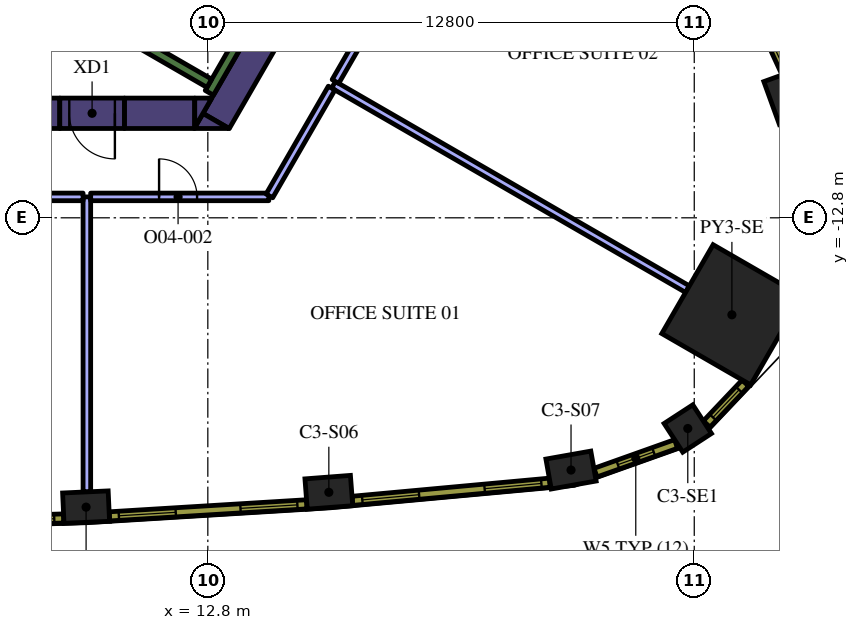
"""IFC4 building model, lengths in metres.
Left out: names, types, materials, properties, quantities, classifications, styles, units other than length and angle.
Written with IfcOpenShell. Run it as: python <this file> out.ifc"""

import sys

from ifc_helpers import new_model, si_unit, direction, frame, frame_2d, origin, origin_2d, place, context, subcontext, project, spatial, polyline, rectangle, outline, extrude, element, fill, save


model = new_model("IFC4")
c1 = context("Model", 3, precision=1e-05, world=origin(), true_north=direction((0.0, 1.0)))
c2 = subcontext(c1, "Body", "Model", "MODEL_VIEW")
j1 = project(units=[si_unit("LENGTHUNIT", "METRE"), si_unit("PLANEANGLEUNIT", "RADIAN")], contexts=[c1])
p1 = place(None, origin())
s1 = spatial("IfcSite", under=j1, at=p1, CompositionType="ELEMENT")
p2 = place(p1, origin())
s2 = spatial("IfcBuilding", under=s1, at=p2, CompositionType="ELEMENT")
p3 = place(p2, frame((0.0, 0.0, 183.6)))
s3 = spatial("IfcBuildingStorey", under=s2, at=p3, CompositionType="ELEMENT", Elevation=183.6)
p4 = place(p3, frame((26.591, -15.352, 0.0), z_axis=(0.0, 0.0, 1.0), x_axis=(0.866025403784, -0.5, 0.0)))
e1 = element("IfcColumn", 1, at=p4, inside=s3, PredefinedType="COLUMN", context=c2, shape_type="SweptSolid", body=[
    extrude(rectangle(XDim=2.7, YDim=2.7, at=origin_2d()), origin(), (0.0, 0.0, 1.0), 4.2),
])
for number, where, z_axis, x_axis in (
    (2, (9.597, -20.413, 0.0), (0.0, 0.0, 1.0), (0.999, 0.046, 0.0)),
    (3, (15.985, -20.022, 0.0), (0.0, 0.0, 1.0), (0.997, 0.076, 0.0)),
    (4, (22.357, -19.437, 0.0), (0.0, 0.0, 1.0), (0.985, 0.175, 0.0)),
):
    element("IfcColumn", number, at=place(p3, frame(where, z_axis=z_axis, x_axis=x_axis)), inside=s3, PredefinedType="COLUMN", context=c2, shape_type="SweptSolid", body=[
        extrude(rectangle(XDim=1.2, YDim=0.8, at=origin_2d()), origin(), (0.0, 0.0, 1.0), 4.2),
    ])
p5 = place(p3, frame((25.43, -18.344, 0.0), z_axis=(0.0, 0.0, 1.0), x_axis=(0.838094050847, 0.545525766518, 0.0)))
e5 = element("IfcColumn", 5, at=p5, inside=s3, PredefinedType="COLUMN", context=c2, shape_type="SweptSolid", body=[
    extrude(rectangle(XDim=0.9, YDim=0.9, at=origin_2d()), origin(), (0.0, 0.0, 1.0), 4.2),
])
p6 = place(p3, frame((28.012, -9.644, 0.0), z_axis=(0.0, 0.0, 1.0), x_axis=(-0.340743851601, 0.940156171918, 0.0)))
e6 = element("IfcColumn", 6, at=p6, inside=s3, PredefinedType="COLUMN", context=c2, shape_type="SweptSolid", body=[
    extrude(rectangle(XDim=1.2, YDim=0.8, at=origin_2d()), origin(), (0.0, 0.0, 1.0), 4.2),
])
p7 = place(p3, frame((13.018, -10.252, 0.0), z_axis=(0.0, 0.0, 1.0), x_axis=(0.499984020225, 0.866034629516, 0.0)))
e7 = element("IfcWall", 7, at=p7, inside=s3, PredefinedType="SOLIDWALL", context=c2, shape_type="SweptSolid", body=[
    extrude(rectangle(XDim=3.824, YDim=0.8, at=frame_2d((1.912, 0.0))), origin(), (0.0, 0.0, 1.0), 4.2),
])
p8 = place(p3, origin())
e8 = element("IfcWall", 8, at=p8, inside=s3, PredefinedType="SOLIDWALL", context=c2, shape_type="SweptSolid", body=[
    extrude(outline(polyline([(12.671, -10.053), (13.358, -10.45), (12.442, -10.45), (12.671, -10.053)])), origin(), (0.0, 0.0, 1.0), 4.2),
])
p9 = place(p3, frame((10.604, -10.05, 0.0), z_axis=(0.0, 0.0, 1.0), x_axis=(1.0, 0.0, 0.0)))
e9 = element("IfcWall", 9, at=p9, inside=s3, PredefinedType="SOLIDWALL", context=c2, shape_type="SweptSolid", body=[
    extrude(rectangle(XDim=1.849, YDim=0.8, at=frame_2d((0.925, 0.0))), origin(), (0.0, 0.0, 1.0), 4.2),
])
e10 = element("IfcWall", 10, at=p8, inside=s3, PredefinedType="SOLIDWALL", context=c2, shape_type="SweptSolid", body=[
    extrude(outline(polyline([(12.904, -9.65), (12.456, -10.426), (12.456, -9.65), (12.904, -9.65)])), origin(), (0.0, 0.0, 1.0), 4.2),
])
p10 = place(p3, frame((-13.378, -10.05, 0.0), z_axis=(0.0, 0.0, 1.0), x_axis=(1.0, 0.0, 0.0)))
e11 = element("IfcWall", 11, at=p10, inside=s3, PredefinedType="SOLIDWALL", context=c2, shape_type="SweptSolid", body=[
    extrude(rectangle(XDim=22.282, YDim=0.8, at=frame_2d((11.141, 0.0))), origin(), (0.0, 0.0, 1.0), 4.2),
])
p11 = place(p3, frame((12.84, -9.511, 0.0), z_axis=(0.0, 0.0, 1.0), x_axis=(0.499997733992, 0.866026712061, 0.0)))
e12 = element("IfcWall", 12, at=p11, inside=s3, PredefinedType="SOLIDWALL", context=c2, shape_type="SweptSolid", body=[
    extrude(rectangle(XDim=3.634, YDim=0.25, at=frame_2d((1.817, 0.0))), origin(), (0.0, 0.0, 1.0), 4.2),
])
p12 = place(p3, frame((12.84, -9.261, 0.0), z_axis=(0.0, 0.0, 1.0), x_axis=(-0.866013990052, 0.500019768644, 0.0)))
e13 = element("IfcWall", 13, at=p12, inside=s3, PredefinedType="SOLIDWALL", context=c2, shape_type="SweptSolid", body=[
    extrude(rectangle(XDim=6.8, YDim=0.25, at=frame_2d((3.4, 0.0))), origin(), (0.0, 0.0, 1.0), 4.2),
])
p13 = place(p3, frame((10.604, -10.05, 0.0), z_axis=(0.0, 0.0, 1.0), x_axis=(-1.0, 0.0, 0.0)))
e14 = element("IfcWall", 14, at=p13, inside=s3, PredefinedType="SOLIDWALL", context=c2, shape_type="SweptSolid", body=[
    extrude(rectangle(XDim=1.7, YDim=0.8, at=frame_2d((0.85, 0.0))), origin(), (0.0, 0.0, 1.0), 4.2),
])
p14 = place(p13, frame((0.25, 0.0, 0.0)))
e15 = element("IfcOpeningElement", 15, at=p14, cuts=e14, PredefinedType="OPENING", context=c2, shape_type="SweptSolid", body=[
    extrude(rectangle(XDim=1.2, YDim=2.1, at=frame_2d((0.6, 1.05))), frame((0.0, 0.41, 0.0), z_axis=(0.0, -1.0, 0.0), x_axis=(1.0, 0.0, 0.0)), (0.0, 0.0, 1.0), 0.82),
])
p15 = place(p3, frame((9.617, -12.25, 0.0), z_axis=(0.0, 0.0, 1.0), x_axis=(0.0, -1.0, 0.0)))
e16 = element("IfcWall", 16, at=p15, inside=s3, PredefinedType="PARTITIONING", context=c2, shape_type="SweptSolid", body=[
    extrude(rectangle(XDim=7.761, YDim=0.2, at=frame_2d((3.881, 0.0))), origin(), (0.0, 0.0, 1.0), 3.15),
])
p16 = place(p3, frame((3.53, -12.25, 0.0), z_axis=(0.0, 0.0, 1.0), x_axis=(1.0, 0.0, 0.0)))
e17 = element("IfcWall", 17, at=p16, inside=s3, PredefinedType="PARTITIONING", context=c2, shape_type="SweptSolid", body=[
    extrude(rectangle(XDim=5.987, YDim=0.2, at=frame_2d((2.994, 0.0))), origin(), (0.0, 0.0, 1.0), 3.15),
])
p17 = place(p3, frame((16.108, -9.3, 0.0), z_axis=(0.0, 0.0, 1.0), x_axis=(0.866027180319, -0.499996922939, 0.0)))
e18 = element("IfcWall", 18, at=p17, inside=s3, PredefinedType="PARTITIONING", context=c2, shape_type="SweptSolid", body=[
    extrude(rectangle(XDim=10.754, YDim=0.2, at=frame_2d((5.377, 0.0))), origin(), (0.0, 0.0, 1.0), 3.15),
])
p18 = place(p3, frame((9.717, -12.25, 0.0), z_axis=(0.0, 0.0, 1.0), x_axis=(1.0, 0.0, 0.0)))
e19 = element("IfcWall", 19, at=p18, inside=s3, PredefinedType="PARTITIONING", context=c2, shape_type="SweptSolid", body=[
    extrude(rectangle(XDim=4.688, YDim=0.2, at=frame_2d((2.344, 0.0))), origin(), (0.0, 0.0, 1.0), 3.15),
])
p19 = place(p18, frame((1.8, 0.0, 0.0)))
e20 = element("IfcOpeningElement", 20, at=p19, cuts=e19, PredefinedType="OPENING", context=c2, shape_type="SweptSolid", body=[
    extrude(rectangle(XDim=1.0, YDim=2.1, at=frame_2d((0.5, 1.05))), frame((0.0, 0.11, 0.0), z_axis=(0.0, -1.0, 0.0), x_axis=(1.0, 0.0, 0.0)), (0.0, 0.0, 1.0), 0.22),
])
p20 = place(p3, frame((14.42, -12.224, 0.0), z_axis=(0.0, 0.0, 1.0), x_axis=(0.500001965626, 0.866024268927, 0.0)))
e21 = element("IfcWall", 21, at=p20, inside=s3, PredefinedType="PARTITIONING", context=c2, shape_type="SweptSolid", body=[
    extrude(rectangle(XDim=3.276, YDim=0.2, at=frame_2d((1.638, 0.0))), origin(), (0.0, 0.0, 1.0), 3.15),
])
p21 = place(p3, frame((16.158, -9.213, 0.0), z_axis=(0.0, 0.0, 1.0), x_axis=(0.499990919662, 0.866030646256, 0.0)))
e22 = element("IfcWall", 22, at=p21, inside=s3, PredefinedType="PARTITIONING", context=c2, shape_type="SweptSolid", body=[
    extrude(rectangle(XDim=3.306, YDim=0.2, at=frame_2d((1.653, 0.0))), origin(), (0.0, 0.0, 1.0), 3.15),
])
p22 = place(p3, frame((3.806, -20.87, 0.0), z_axis=(0.0, 0.0, 1.0), x_axis=(0.999533441983, 0.030543384845, 0.0)))
e23 = element("IfcWall", 23, at=p22, inside=s3, PredefinedType="SOLIDWALL", context=c2, shape_type="SweptSolid", body=[
    extrude(rectangle(XDim=5.204, YDim=0.24, at=frame_2d((2.602, 0.0))), origin(), (0.0, 0.0, 1.0), 3.95),
])
p23 = place(p22, frame((0.248, 0.0, 0.9)))
e24 = element("IfcOpeningElement", 24, at=p23, cuts=e23, PredefinedType="OPENING", context=c2, shape_type="SweptSolid", body=[
    extrude(rectangle(XDim=1.5, YDim=2.55, at=frame_2d((0.75, 1.275))), frame((0.0, 0.13, 0.0), z_axis=(0.0, -1.0, 0.0), x_axis=(1.0, 0.0, 0.0)), (0.0, 0.0, 1.0), 0.26),
])
p24 = place(p22, frame((3.455, 0.0, 0.9)))
e25 = element("IfcOpeningElement", 25, at=p24, cuts=e23, PredefinedType="OPENING", context=c2, shape_type="SweptSolid", body=[
    extrude(rectangle(XDim=1.5, YDim=2.55, at=frame_2d((0.75, 1.275))), frame((0.0, 0.13, 0.0), z_axis=(0.0, -1.0, 0.0), x_axis=(1.0, 0.0, 0.0)), (0.0, 0.0, 1.0), 0.26),
])
p25 = place(p3, frame((10.211, -20.656, 0.0), z_axis=(0.0, 0.0, 1.0), x_axis=(0.998135294646, 0.061040425794, 0.0)))
e26 = element("IfcWall", 26, at=p25, inside=s3, PredefinedType="SOLIDWALL", context=c2, shape_type="SweptSolid", body=[
    extrude(rectangle(XDim=5.204, YDim=0.24, at=frame_2d((2.602, 0.0))), origin(), (0.0, 0.0, 1.0), 3.95),
])
p26 = place(p25, frame((0.248, 0.0, 0.9)))
e27 = element("IfcOpeningElement", 27, at=p26, cuts=e26, PredefinedType="OPENING", context=c2, shape_type="SweptSolid", body=[
    extrude(rectangle(XDim=1.5, YDim=2.55, at=frame_2d((0.75, 1.275))), frame((0.0, 0.13, 0.0), z_axis=(0.0, -1.0, 0.0), x_axis=(1.0, 0.0, 0.0)), (0.0, 0.0, 1.0), 0.26),
])
p27 = place(p25, frame((3.455, 0.0, 0.9)))
e28 = element("IfcOpeningElement", 28, at=p27, cuts=e26, PredefinedType="OPENING", context=c2, shape_type="SweptSolid", body=[
    extrude(rectangle(XDim=1.5, YDim=2.55, at=frame_2d((0.75, 1.275))), frame((0.0, 0.13, 0.0), z_axis=(0.0, -1.0, 0.0), x_axis=(1.0, 0.0, 0.0)), (0.0, 0.0, 1.0), 0.26),
])
p28 = place(p3, frame((16.606, -20.247, 0.0), z_axis=(0.0, 0.0, 1.0), x_axis=(0.995808712151, 0.091460422067, 0.0)))
e29 = element("IfcWall", 29, at=p28, inside=s3, PredefinedType="SOLIDWALL", context=c2, shape_type="SweptSolid", body=[
    extrude(rectangle(XDim=5.213, YDim=0.24, at=frame_2d((2.606, 0.0))), origin(), (0.0, 0.0, 1.0), 3.95),
])
p29 = place(p28, frame((0.261, 0.0, 0.9)))
e30 = element("IfcOpeningElement", 30, at=p29, cuts=e29, PredefinedType="OPENING", context=c2, shape_type="SweptSolid", body=[
    extrude(rectangle(XDim=1.5, YDim=2.55, at=frame_2d((0.75, 1.275))), frame((0.0, 0.13, 0.0), z_axis=(0.0, -1.0, 0.0), x_axis=(1.0, 0.0, 0.0)), (0.0, 0.0, 1.0), 0.26),
])
p30 = place(p28, frame((3.492, 0.0, 0.9)))
e31 = element("IfcOpeningElement", 31, at=p30, cuts=e29, PredefinedType="OPENING", context=c2, shape_type="SweptSolid", body=[
    extrude(rectangle(XDim=1.5, YDim=2.55, at=frame_2d((0.75, 1.275))), frame((0.0, 0.13, 0.0), z_axis=(0.0, -1.0, 0.0), x_axis=(1.0, 0.0, 0.0)), (0.0, 0.0, 1.0), 0.26),
])
p31 = place(p3, frame((23.001, -19.505, 0.0), z_axis=(0.0, 0.0, 1.0), x_axis=(0.942099727267, 0.335332825539, 0.0)))
e32 = element("IfcWall", 32, at=p31, inside=s3, PredefinedType="SOLIDWALL", context=c2, shape_type="SweptSolid", body=[
    extrude(rectangle(XDim=2.25, YDim=0.24, at=frame_2d((1.125, 0.0))), origin(), (0.0, 0.0, 1.0), 3.95),
])
p32 = place(p31, frame((0.625, 0.0, 0.9)))
e33 = element("IfcOpeningElement", 33, at=p32, cuts=e32, PredefinedType="OPENING", context=c2, shape_type="SweptSolid", body=[
    extrude(rectangle(XDim=1.0, YDim=2.55, at=frame_2d((0.5, 1.275))), frame((0.0, 0.13, 0.0), z_axis=(0.0, -1.0, 0.0), x_axis=(1.0, 0.0, 0.0)), (0.0, 0.0, 1.0), 0.26),
])
p33 = place(p3, frame((25.927, -18.226, 0.0), z_axis=(0.0, 0.0, 1.0), x_axis=(0.687986858937, 0.725723144133, 0.0)))
e34 = element("IfcWall", 34, at=p33, inside=s3, PredefinedType="SOLIDWALL", context=c2, shape_type="SweptSolid", body=[
    extrude(rectangle(XDim=1.481, YDim=0.24, at=frame_2d((0.741, 0.0))), origin(), (0.0, 0.0, 1.0), 3.95),
])
p34 = place(p33, frame((0.241, 0.0, 0.9)))
e35 = element("IfcOpeningElement", 35, at=p34, cuts=e34, PredefinedType="OPENING", context=c2, shape_type="SweptSolid", body=[
    extrude(rectangle(XDim=1.0, YDim=2.55, at=frame_2d((0.5, 1.275))), frame((0.0, 0.13, 0.0), z_axis=(0.0, -1.0, 0.0), x_axis=(1.0, 0.0, 0.0)), (0.0, 0.0, 1.0), 0.26),
])
p35 = place(p3, frame((28.02, -8.992, 0.0), z_axis=(0.0, 0.0, 1.0), x_axis=(-0.418722559465, 0.908114209885, 0.0)))
e36 = element("IfcWall", 36, at=p35, inside=s3, PredefinedType="SOLIDWALL", context=c2, shape_type="SweptSolid", body=[
    extrude(rectangle(XDim=5.213, YDim=0.24, at=frame_2d((2.606, 0.0))), origin(), (0.0, 0.0, 1.0), 3.95),
])
p36 = place(p35, frame((0.221, 0.0, 0.9)))
e37 = element("IfcOpeningElement", 37, at=p36, cuts=e36, PredefinedType="OPENING", context=c2, shape_type="SweptSolid", body=[
    extrude(rectangle(XDim=1.5, YDim=2.55, at=frame_2d((0.75, 1.275))), frame((0.0, 0.13, 0.0), z_axis=(0.0, -1.0, 0.0), x_axis=(1.0, 0.0, 0.0)), (0.0, 0.0, 1.0), 0.26),
])
p37 = place(p35, frame((3.452, 0.0, 0.9)))
e38 = element("IfcOpeningElement", 38, at=p37, cuts=e36, PredefinedType="OPENING", context=c2, shape_type="SweptSolid", body=[
    extrude(rectangle(XDim=1.5, YDim=2.55, at=frame_2d((0.75, 1.275))), frame((0.0, 0.13, 0.0), z_axis=(0.0, -1.0, 0.0), x_axis=(1.0, 0.0, 0.0)), (0.0, 0.0, 1.0), 0.26),
])
p38 = place(p14, origin())
e39 = element("IfcDoor", 39, at=p38, inside=s3, OperationType="SINGLE_SWING_LEFT", PredefinedType="DOOR", context=c2, shape_type="SweptSolid", body=[
    extrude(rectangle(XDim=1.2, YDim=2.1, at=frame_2d((0.6, 1.05))), frame((0.0, 0.025, 0.0), z_axis=(0.0, -1.0, 0.0), x_axis=(1.0, 0.0, 0.0)), (0.0, 0.0, 1.0), 0.05),
])
fill(e15, e39)
p39 = place(p19, origin())
e40 = element("IfcDoor", 40, at=p39, inside=s3, OperationType="SINGLE_SWING_LEFT", PredefinedType="DOOR", context=c2, shape_type="SweptSolid", body=[
    extrude(rectangle(XDim=1.0, YDim=2.1, at=frame_2d((0.5, 1.05))), frame((0.0, 0.025, 0.0), z_axis=(0.0, -1.0, 0.0), x_axis=(1.0, 0.0, 0.0)), (0.0, 0.0, 1.0), 0.05),
])
fill(e20, e40)
p40 = place(p24, origin())
e41 = element("IfcWindow", 41, at=p40, inside=s3, PartitioningType="SINGLE_PANEL", PredefinedType="WINDOW", context=c2, shape_type="SweptSolid", body=[
    extrude(rectangle(XDim=1.5, YDim=2.55, at=frame_2d((0.75, 1.275))), frame((0.0, 0.04, 0.0), z_axis=(0.0, -1.0, 0.0), x_axis=(1.0, 0.0, 0.0)), (0.0, 0.0, 1.0), 0.06),
])
fill(e25, e41)
p41 = place(p26, origin())
e42 = element("IfcWindow", 42, at=p41, inside=s3, PartitioningType="SINGLE_PANEL", PredefinedType="WINDOW", context=c2, shape_type="SweptSolid", body=[
    extrude(rectangle(XDim=1.5, YDim=2.55, at=frame_2d((0.75, 1.275))), frame((0.0, 0.04, 0.0), z_axis=(0.0, -1.0, 0.0), x_axis=(1.0, 0.0, 0.0)), (0.0, 0.0, 1.0), 0.06),
])
fill(e27, e42)
p42 = place(p27, origin())
e43 = element("IfcWindow", 43, at=p42, inside=s3, PartitioningType="SINGLE_PANEL", PredefinedType="WINDOW", context=c2, shape_type="SweptSolid", body=[
    extrude(rectangle(XDim=1.5, YDim=2.55, at=frame_2d((0.75, 1.275))), frame((0.0, 0.04, 0.0), z_axis=(0.0, -1.0, 0.0), x_axis=(1.0, 0.0, 0.0)), (0.0, 0.0, 1.0), 0.06),
])
fill(e28, e43)
p43 = place(p29, origin())
e44 = element("IfcWindow", 44, at=p43, inside=s3, PartitioningType="SINGLE_PANEL", PredefinedType="WINDOW", context=c2, shape_type="SweptSolid", body=[
    extrude(rectangle(XDim=1.5, YDim=2.55, at=frame_2d((0.75, 1.275))), frame((0.0, 0.04, 0.0), z_axis=(0.0, -1.0, 0.0), x_axis=(1.0, 0.0, 0.0)), (0.0, 0.0, 1.0), 0.06),
])
fill(e30, e44)
p44 = place(p30, origin())
e45 = element("IfcWindow", 45, at=p44, inside=s3, PartitioningType="SINGLE_PANEL", PredefinedType="WINDOW", context=c2, shape_type="SweptSolid", body=[
    extrude(rectangle(XDim=1.5, YDim=2.55, at=frame_2d((0.75, 1.275))), frame((0.0, 0.04, 0.0), z_axis=(0.0, -1.0, 0.0), x_axis=(1.0, 0.0, 0.0)), (0.0, 0.0, 1.0), 0.06),
])
fill(e31, e45)
p45 = place(p32, origin())
e46 = element("IfcWindow", 46, at=p45, inside=s3, PartitioningType="SINGLE_PANEL", PredefinedType="WINDOW", context=c2, shape_type="SweptSolid", body=[
    extrude(rectangle(XDim=1.0, YDim=2.55, at=frame_2d((0.5, 1.275))), frame((0.0, 0.04, 0.0), z_axis=(0.0, -1.0, 0.0), x_axis=(1.0, 0.0, 0.0)), (0.0, 0.0, 1.0), 0.06),
])
fill(e33, e46)
p46 = place(p34, origin())
e47 = element("IfcWindow", 47, at=p46, inside=s3, PartitioningType="SINGLE_PANEL", PredefinedType="WINDOW", context=c2, shape_type="SweptSolid", body=[
    extrude(rectangle(XDim=1.0, YDim=2.55, at=frame_2d((0.5, 1.275))), frame((0.0, 0.04, 0.0), z_axis=(0.0, -1.0, 0.0), x_axis=(1.0, 0.0, 0.0)), (0.0, 0.0, 1.0), 0.06),
])
fill(e35, e47)
p47 = place(p36, origin())
e48 = element("IfcWindow", 48, at=p47, inside=s3, PartitioningType="SINGLE_PANEL", PredefinedType="WINDOW", context=c2, shape_type="SweptSolid", body=[
    extrude(rectangle(XDim=1.5, YDim=2.55, at=frame_2d((0.75, 1.275))), frame((0.0, 0.04, 0.0), z_axis=(0.0, -1.0, 0.0), x_axis=(1.0, 0.0, 0.0)), (0.0, 0.0, 1.0), 0.06),
])
fill(e37, e48)
save(model, sys.argv[1])
